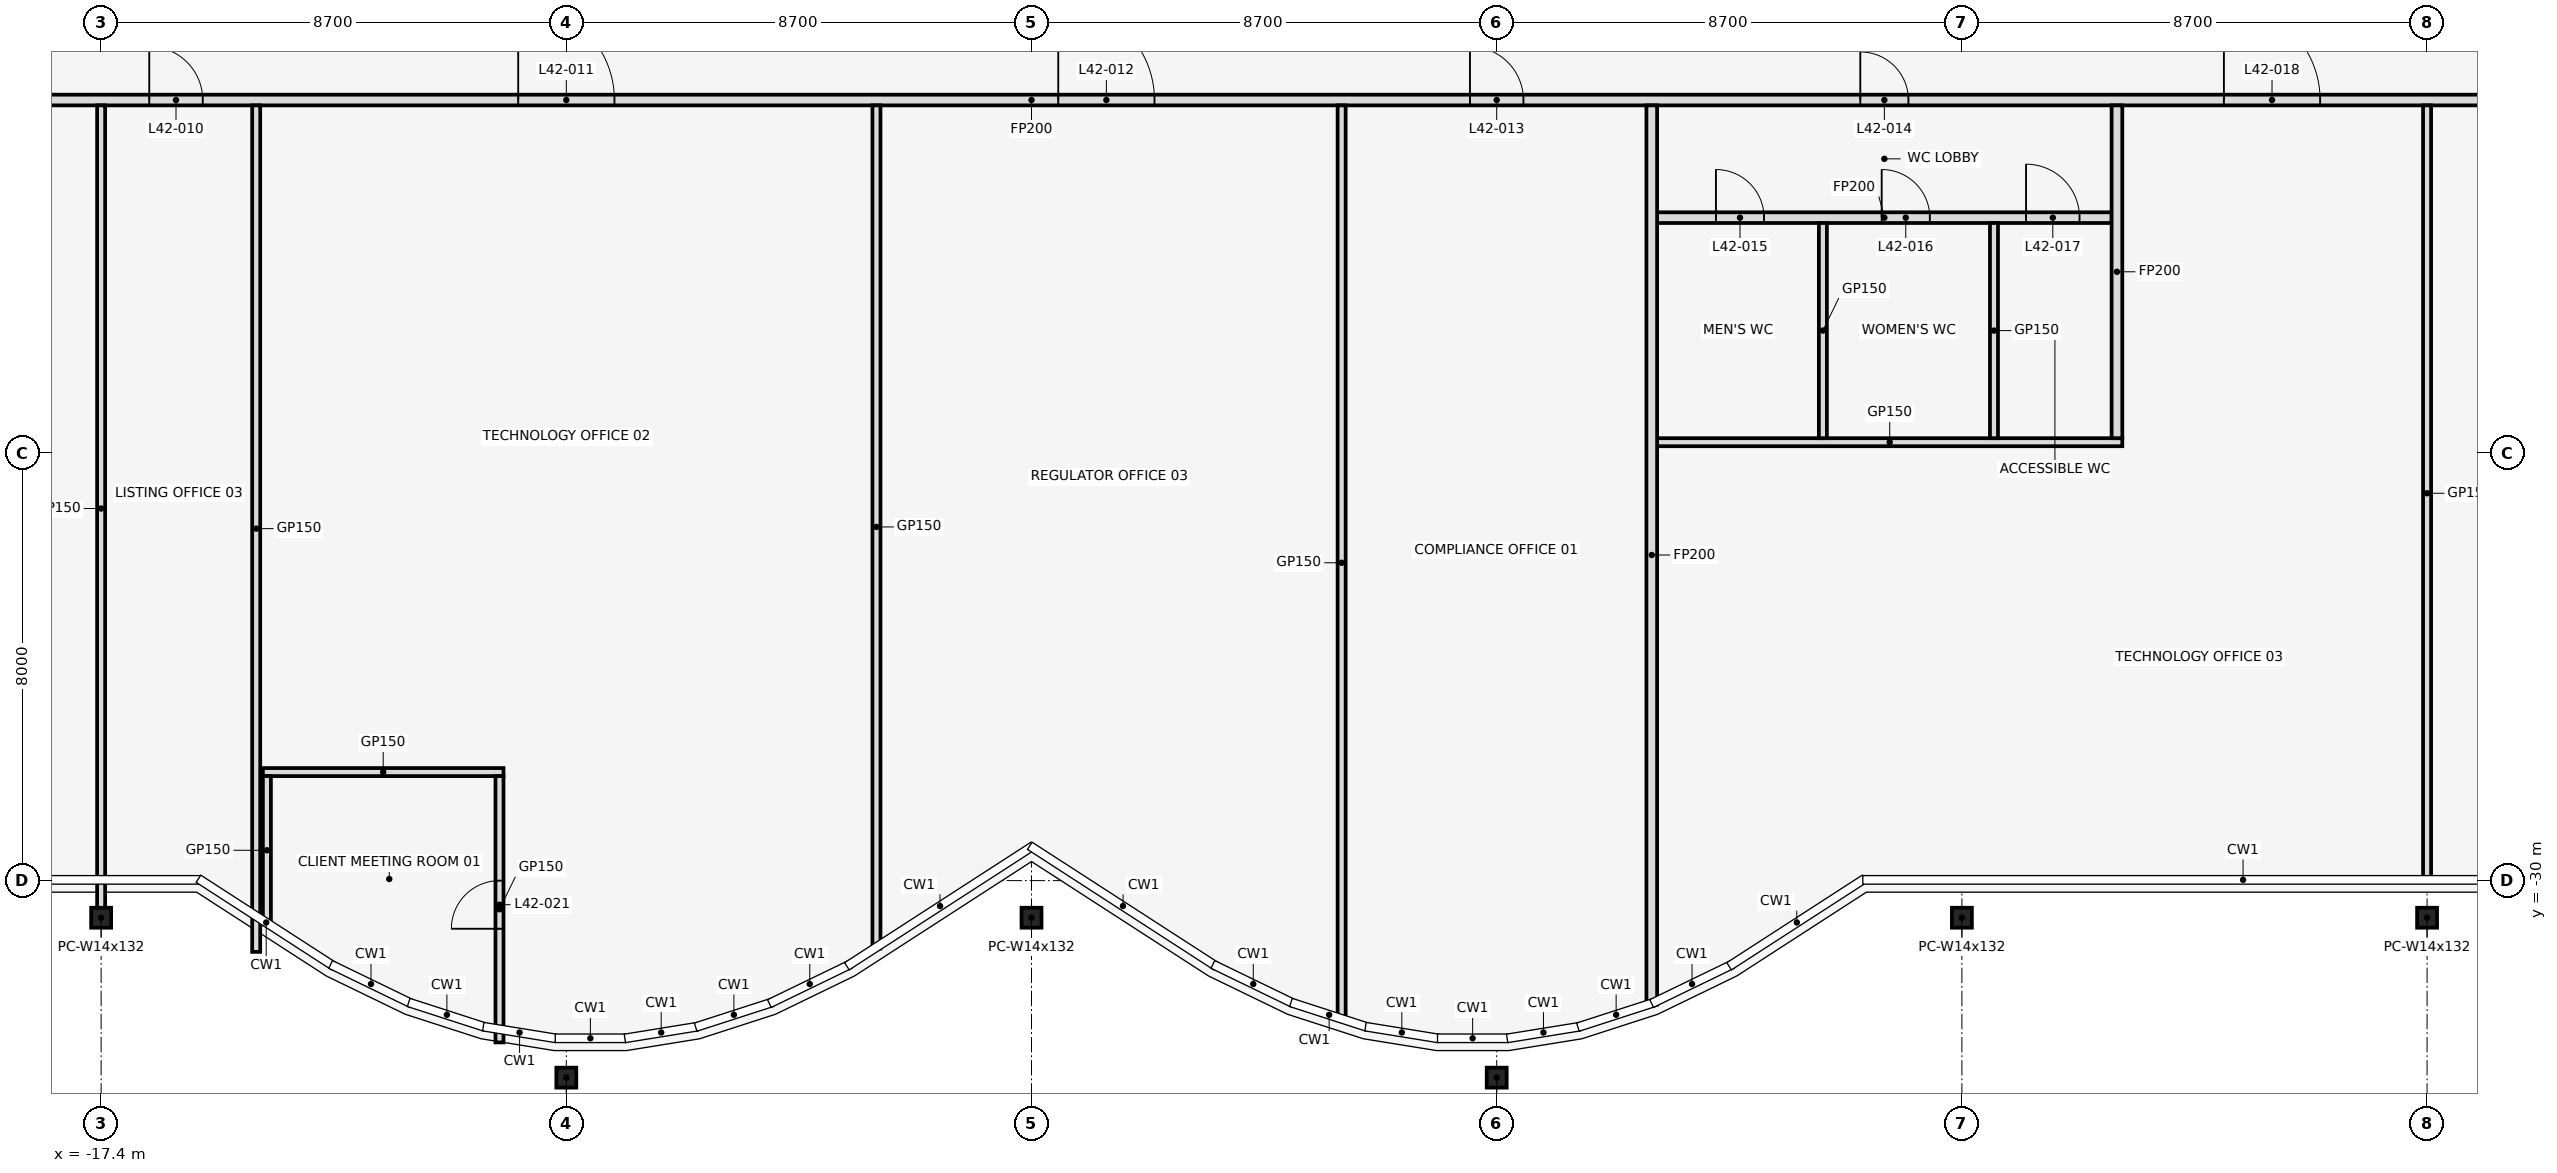
"""IFC4 building model, lengths in metres.
Left out: names, types, materials, properties, quantities, classifications, styles, units other than length and angle.
Written with IfcOpenShell. Run it as: python <this file> out.ifc"""

import sys

from ifc_helpers import new_model, si_unit, direction, frame, frame_2d, origin, origin_2d, place, context, subcontext, project, spatial, rectangle, i_section, extrude, element, fill, save


model = new_model("IFC4")
c1 = context("Model", 3, precision=1e-05, world=origin(), true_north=direction((0.0, 1.0)))
c2 = subcontext(c1, "Body", "Model", "MODEL_VIEW")
j1 = project(units=[si_unit("LENGTHUNIT", "METRE"), si_unit("PLANEANGLEUNIT", "RADIAN")], contexts=[c1])
p1 = place(None, origin())
s1 = spatial("IfcSite", under=j1, at=p1, CompositionType="ELEMENT")
p2 = place(p1, origin())
s2 = spatial("IfcBuilding", under=s1, at=p2, CompositionType="ELEMENT")
p3 = place(p2, frame((0.0, 0.0, 190.9)))
s3 = spatial("IfcBuildingStorey", under=s2, at=p3, CompositionType="ELEMENT", Elevation=190.9)
for number, where, z_axis, x_axis in (
    (1, (-17.4, -30.694, 0.0), (0.0, 0.0, 1.0), (1.0, 0.0, 0.0)),
    (2, (-8.7, -33.685, 0.0), (0.0, 0.0, 1.0), (1.0, 0.0, 0.0)),
    (3, (0.0, -30.694, 0.0), (0.0, 0.0, 1.0), (1.0, 0.0, 0.0)),
    (4, (8.7, -33.685, 0.0), (0.0, 0.0, 1.0), (1.0, 0.0, 0.0)),
    (5, (17.4, -30.694, 0.0), (0.0, 0.0, 1.0), (1.0, 0.0, 0.0)),
    (6, (26.1, -30.694, 0.0), (0.0, 0.0, 1.0), (1.0, 0.0, 0.0)),
):
    element("IfcColumn", number, at=place(p3, frame(where, z_axis=z_axis, x_axis=x_axis)), inside=s3, PredefinedType="COLUMN", context=c2, shape_type="SweptSolid", body=[
        extrude(i_section(OverallWidth=0.373, OverallDepth=0.373, WebThickness=0.016, FlangeThickness=0.026, at=origin_2d()), origin(), (0.0, 0.0, 1.0), 4.1),
    ])
p4 = place(p3, frame((-14.375, -27.97, 0.0), z_axis=(0.0, 0.0, 1.0), x_axis=(1.0, 0.0, 0.0)))
e7 = element("IfcWall", 7, at=p4, inside=s3, PredefinedType="PARTITIONING", context=c2, shape_type="SweptSolid", body=[
    extrude(rectangle(XDim=4.5, YDim=0.15, at=frame_2d((2.25, 0.0))), origin(), (0.0, 0.0, 1.0), 2.96),
])
p5 = place(p3, frame((11.7, -21.8, 0.0), z_axis=(0.0, 0.0, 1.0), x_axis=(1.0, 0.0, 0.0)))
e8 = element("IfcWall", 8, at=p5, inside=s3, PredefinedType="PARTITIONING", context=c2, shape_type="SweptSolid", body=[
    extrude(rectangle(XDim=8.7, YDim=0.15, at=frame_2d((4.35, 0.0))), origin(), (0.0, 0.0, 1.0), 2.96),
])
p6 = place(p3, frame((11.7, -17.6, 0.0), z_axis=(0.0, 0.0, 1.0), x_axis=(1.0, 0.0, 0.0)))
e9 = element("IfcWall", 9, at=p6, inside=s3, PredefinedType="PARTITIONING", context=c2, shape_type="SweptSolid", body=[
    extrude(rectangle(XDim=8.5, YDim=0.2, at=frame_2d((4.25, 0.0))), origin(), (0.0, 0.0, 1.0), 2.96),
])
p7 = place(p6, frame((1.1, 0.0, 0.0)))
e10 = element("IfcOpeningElement", 10, at=p7, cuts=e9, PredefinedType="OPENING", context=c2, shape_type="SweptSolid", body=[
    extrude(rectangle(XDim=0.9, YDim=2.1, at=frame_2d((0.45, 1.05))), frame((0.0, 0.112, 0.0), z_axis=(0.0, -1.0, 0.0), x_axis=(1.0, 0.0, 0.0)), (0.0, 0.0, 1.0), 0.224),
])
p8 = place(p6, frame((4.2, 0.0, 0.0)))
e11 = element("IfcOpeningElement", 11, at=p8, cuts=e9, PredefinedType="OPENING", context=c2, shape_type="SweptSolid", body=[
    extrude(rectangle(XDim=0.9, YDim=2.1, at=frame_2d((0.45, 1.05))), frame((0.0, 0.112, 0.0), z_axis=(0.0, -1.0, 0.0), x_axis=(1.0, 0.0, 0.0)), (0.0, 0.0, 1.0), 0.224),
])
p9 = place(p6, frame((6.9, 0.0, 0.0)))
e12 = element("IfcOpeningElement", 12, at=p9, cuts=e9, PredefinedType="OPENING", context=c2, shape_type="SweptSolid", body=[
    extrude(rectangle(XDim=1.0, YDim=2.1, at=frame_2d((0.5, 1.05))), frame((0.0, 0.112, 0.0), z_axis=(0.0, -1.0, 0.0), x_axis=(1.0, 0.0, 0.0)), (0.0, 0.0, 1.0), 0.224),
])
p10 = place(p3, frame((-32.79, -15.4, 0.0), z_axis=(0.0, 0.0, 1.0), x_axis=(1.0, 0.0, 0.0)))
e13 = element("IfcWall", 13, at=p10, inside=s3, PredefinedType="PARTITIONING", context=c2, shape_type="SweptSolid", body=[
    extrude(rectangle(XDim=65.58, YDim=0.2, at=frame_2d((32.79, 0.0))), origin(), (0.0, 0.0, 1.0), 2.96),
])
p11 = place(p10, frame((1.4, 0.0, 0.0)))
e14 = element("IfcOpeningElement", 14, at=p11, cuts=e13, PredefinedType="OPENING", context=c2, shape_type="SweptSolid", body=[
    extrude(rectangle(XDim=1.0, YDim=2.1, at=frame_2d((0.5, 1.05))), frame((0.0, 0.112, 0.0), z_axis=(0.0, -1.0, 0.0), x_axis=(1.0, 0.0, 0.0)), (0.0, 0.0, 1.0), 0.224),
])
p12 = place(p10, frame((4.69, 0.0, 0.0)))
e15 = element("IfcOpeningElement", 15, at=p12, cuts=e13, PredefinedType="OPENING", context=c2, shape_type="SweptSolid", body=[
    extrude(rectangle(XDim=1.0, YDim=2.1, at=frame_2d((0.5, 1.05))), frame((0.0, 0.112, 0.0), z_axis=(0.0, -1.0, 0.0), x_axis=(1.0, 0.0, 0.0)), (0.0, 0.0, 1.0), 0.224),
])
p13 = place(p10, frame((10.59, 0.0, 0.0)))
e16 = element("IfcOpeningElement", 16, at=p13, cuts=e13, PredefinedType="OPENING", context=c2, shape_type="SweptSolid", body=[
    extrude(rectangle(XDim=1.0, YDim=2.1, at=frame_2d((0.5, 1.05))), frame((0.0, 0.112, 0.0), z_axis=(0.0, -1.0, 0.0), x_axis=(1.0, 0.0, 0.0)), (0.0, 0.0, 1.0), 0.224),
])
p14 = place(p10, frame((16.29, 0.0, 0.0)))
e17 = element("IfcOpeningElement", 17, at=p14, cuts=e13, PredefinedType="OPENING", context=c2, shape_type="SweptSolid", body=[
    extrude(rectangle(XDim=1.0, YDim=2.1, at=frame_2d((0.5, 1.05))), frame((0.0, 0.112, 0.0), z_axis=(0.0, -1.0, 0.0), x_axis=(1.0, 0.0, 0.0)), (0.0, 0.0, 1.0), 0.224),
])
p15 = place(p10, frame((23.19, 0.0, 0.0)))
e18 = element("IfcOpeningElement", 18, at=p15, cuts=e13, PredefinedType="OPENING", context=c2, shape_type="SweptSolid", body=[
    extrude(rectangle(XDim=1.8, YDim=2.1, at=frame_2d((0.9, 1.05))), frame((0.0, 0.112, 0.0), z_axis=(0.0, -1.0, 0.0), x_axis=(1.0, 0.0, 0.0)), (0.0, 0.0, 1.0), 0.224),
])
p16 = place(p10, frame((33.29, 0.0, 0.0)))
e19 = element("IfcOpeningElement", 19, at=p16, cuts=e13, PredefinedType="OPENING", context=c2, shape_type="SweptSolid", body=[
    extrude(rectangle(XDim=1.8, YDim=2.1, at=frame_2d((0.9, 1.05))), frame((0.0, 0.112, 0.0), z_axis=(0.0, -1.0, 0.0), x_axis=(1.0, 0.0, 0.0)), (0.0, 0.0, 1.0), 0.224),
])
p17 = place(p10, frame((40.99, 0.0, 0.0)))
e20 = element("IfcOpeningElement", 20, at=p17, cuts=e13, PredefinedType="OPENING", context=c2, shape_type="SweptSolid", body=[
    extrude(rectangle(XDim=1.0, YDim=2.1, at=frame_2d((0.5, 1.05))), frame((0.0, 0.112, 0.0), z_axis=(0.0, -1.0, 0.0), x_axis=(1.0, 0.0, 0.0)), (0.0, 0.0, 1.0), 0.224),
])
p18 = place(p10, frame((48.29, 0.0, 0.0)))
e21 = element("IfcOpeningElement", 21, at=p18, cuts=e13, PredefinedType="OPENING", context=c2, shape_type="SweptSolid", body=[
    extrude(rectangle(XDim=0.9, YDim=2.1, at=frame_2d((0.45, 1.05))), frame((0.0, 0.112, 0.0), z_axis=(0.0, -1.0, 0.0), x_axis=(1.0, 0.0, 0.0)), (0.0, 0.0, 1.0), 0.224),
])
p19 = place(p10, frame((55.09, 0.0, 0.0)))
e22 = element("IfcOpeningElement", 22, at=p19, cuts=e13, PredefinedType="OPENING", context=c2, shape_type="SweptSolid", body=[
    extrude(rectangle(XDim=1.8, YDim=2.1, at=frame_2d((0.9, 1.05))), frame((0.0, 0.112, 0.0), z_axis=(0.0, -1.0, 0.0), x_axis=(1.0, 0.0, 0.0)), (0.0, 0.0, 1.0), 0.224),
])
p20 = place(p10, frame((61.69, 0.0, 0.0)))
e23 = element("IfcOpeningElement", 23, at=p20, cuts=e13, PredefinedType="OPENING", context=c2, shape_type="SweptSolid", body=[
    extrude(rectangle(XDim=1.0, YDim=2.1, at=frame_2d((0.5, 1.05))), frame((0.0, 0.112, 0.0), z_axis=(0.0, -1.0, 0.0), x_axis=(1.0, 0.0, 0.0)), (0.0, 0.0, 1.0), 0.224),
])
p21 = place(p3, frame((-17.4, -30.58, 0.0), z_axis=(0.0, 0.0, 1.0), x_axis=(0.0, 1.0, 0.0)))
e24 = element("IfcWall", 24, at=p21, inside=s3, PredefinedType="PARTITIONING", context=c2, shape_type="SweptSolid", body=[
    extrude(rectangle(XDim=15.08, YDim=0.15, at=frame_2d((7.54, 0.0))), origin(), (0.0, 0.0, 1.0), 2.96),
])
p22 = place(p3, frame((-14.5, -31.333, 0.0), z_axis=(0.0, 0.0, 1.0), x_axis=(0.0, 1.0, 0.0)))
e25 = element("IfcWall", 25, at=p22, inside=s3, PredefinedType="PARTITIONING", context=c2, shape_type="SweptSolid", body=[
    extrude(rectangle(XDim=15.833, YDim=0.15, at=frame_2d((7.917, 0.0))), origin(), (0.0, 0.0, 1.0), 2.96),
])
p23 = place(p3, frame((-14.3, -30.82, 0.0), z_axis=(0.0, 0.0, 1.0), x_axis=(0.0, 1.0, 0.0)))
e26 = element("IfcWall", 26, at=p23, inside=s3, PredefinedType="PARTITIONING", context=c2, shape_type="SweptSolid", body=[
    extrude(rectangle(XDim=2.775, YDim=0.15, at=frame_2d((1.388, 0.0))), origin(), (0.0, 0.0, 1.0), 2.96),
])
p24 = place(p3, frame((-9.95, -33.026, 0.0), z_axis=(0.0, 0.0, 1.0), x_axis=(0.0, 1.0, 0.0)))
e27 = element("IfcWall", 27, at=p24, inside=s3, PredefinedType="PARTITIONING", context=c2, shape_type="SweptSolid", body=[
    extrude(rectangle(XDim=4.981, YDim=0.15, at=frame_2d((2.491, 0.0))), origin(), (0.0, 0.0, 1.0), 2.96),
])
p25 = place(p24, frame((2.126, 0.0, 0.0)))
e28 = element("IfcOpeningElement", 28, at=p25, cuts=e27, PredefinedType="OPENING", context=c2, shape_type="SweptSolid", body=[
    extrude(rectangle(XDim=0.9, YDim=2.1, at=frame_2d((0.45, 1.05))), frame((0.0, 0.087, 0.0), z_axis=(0.0, -1.0, 0.0), x_axis=(1.0, 0.0, 0.0)), (0.0, 0.0, 1.0), 0.174),
])
p26 = place(p3, frame((-2.9, -31.27, 0.0), z_axis=(0.0, 0.0, 1.0), x_axis=(0.0, 1.0, 0.0)))
e29 = element("IfcWall", 29, at=p26, inside=s3, PredefinedType="PARTITIONING", context=c2, shape_type="SweptSolid", body=[
    extrude(rectangle(XDim=15.77, YDim=0.15, at=frame_2d((7.885, 0.0))), origin(), (0.0, 0.0, 1.0), 2.96),
])
p27 = place(p3, frame((5.8, -32.61, 0.0), z_axis=(0.0, 0.0, 1.0), x_axis=(0.0, 1.0, 0.0)))
e30 = element("IfcWall", 30, at=p27, inside=s3, PredefinedType="PARTITIONING", context=c2, shape_type="SweptSolid", body=[
    extrude(rectangle(XDim=17.11, YDim=0.15, at=frame_2d((8.555, 0.0))), origin(), (0.0, 0.0, 1.0), 2.96),
])
p28 = place(p3, frame((11.6, -32.32, 0.0), z_axis=(0.0, 0.0, 1.0), x_axis=(0.0, 1.0, 0.0)))
e31 = element("IfcWall", 31, at=p28, inside=s3, PredefinedType="PARTITIONING", context=c2, shape_type="SweptSolid", body=[
    extrude(rectangle(XDim=16.82, YDim=0.2, at=frame_2d((8.41, 0.0))), origin(), (0.0, 0.0, 1.0), 2.96),
])
for number, where, z_axis, x_axis in (
    (32, (14.8, -21.725, 0.0), (0.0, 0.0, 1.0), (0.0, 1.0, 0.0)),
    (33, (18.0, -21.725, 0.0), (0.0, 0.0, 1.0), (0.0, 1.0, 0.0)),
):
    element("IfcWall", number, at=place(p3, frame(where, z_axis=z_axis, x_axis=x_axis)), inside=s3, PredefinedType="PARTITIONING", context=c2, shape_type="SweptSolid", body=[
        extrude(rectangle(XDim=4.025, YDim=0.15, at=frame_2d((2.013, 0.0))), origin(), (0.0, 0.0, 1.0), 2.96),
    ])
p29 = place(p3, frame((20.3, -21.725, 0.0), z_axis=(0.0, 0.0, 1.0), x_axis=(0.0, 1.0, 0.0)))
e34 = element("IfcWall", 34, at=p29, inside=s3, PredefinedType="PARTITIONING", context=c2, shape_type="SweptSolid", body=[
    extrude(rectangle(XDim=6.225, YDim=0.2, at=frame_2d((3.113, 0.0))), origin(), (0.0, 0.0, 1.0), 2.96),
])
p30 = place(p3, frame((26.1, -30.01, 0.0), z_axis=(0.0, 0.0, 1.0), x_axis=(0.0, 1.0, 0.0)))
e35 = element("IfcWall", 35, at=p30, inside=s3, PredefinedType="PARTITIONING", context=c2, shape_type="SweptSolid", body=[
    extrude(rectangle(XDim=14.51, YDim=0.15, at=frame_2d((7.255, 0.0))), origin(), (0.0, 0.0, 1.0), 2.96),
])
p31 = place(p14, frame((1.0, 0.0, 0.0), z_axis=(0.0, 0.0, 1.0), x_axis=(-1.0, 0.0, 0.0)))
e36 = element("IfcDoor", 36, at=p31, inside=s3, OperationType="SINGLE_SWING_LEFT", PredefinedType="DOOR", context=c2, shape_type="SweptSolid", body=[
    extrude(rectangle(XDim=1.0, YDim=2.1, at=frame_2d((0.5, 1.05))), frame((0.0, 0.025, 0.0), z_axis=(0.0, -1.0, 0.0), x_axis=(1.0, 0.0, 0.0)), (0.0, 0.0, 1.0), 0.05),
])
fill(e17, e36)
p32 = place(p15, origin())
e37 = element("IfcDoor", 37, at=p32, inside=s3, OperationType="SINGLE_SWING_LEFT", PredefinedType="DOOR", context=c2, shape_type="SweptSolid", body=[
    extrude(rectangle(XDim=1.8, YDim=2.1, at=frame_2d((0.9, 1.05))), frame((0.0, 0.025, 0.0), z_axis=(0.0, -1.0, 0.0), x_axis=(1.0, 0.0, 0.0)), (0.0, 0.0, 1.0), 0.05),
])
fill(e18, e37)
p33 = place(p16, origin())
e38 = element("IfcDoor", 38, at=p33, inside=s3, OperationType="SINGLE_SWING_LEFT", PredefinedType="DOOR", context=c2, shape_type="SweptSolid", body=[
    extrude(rectangle(XDim=1.8, YDim=2.1, at=frame_2d((0.9, 1.05))), frame((0.0, 0.025, 0.0), z_axis=(0.0, -1.0, 0.0), x_axis=(1.0, 0.0, 0.0)), (0.0, 0.0, 1.0), 0.05),
])
fill(e19, e38)
p34 = place(p17, frame((1.0, 0.0, 0.0), z_axis=(0.0, 0.0, 1.0), x_axis=(-1.0, 0.0, 0.0)))
e39 = element("IfcDoor", 39, at=p34, inside=s3, OperationType="SINGLE_SWING_LEFT", PredefinedType="DOOR", context=c2, shape_type="SweptSolid", body=[
    extrude(rectangle(XDim=1.0, YDim=2.1, at=frame_2d((0.5, 1.05))), frame((0.0, 0.025, 0.0), z_axis=(0.0, -1.0, 0.0), x_axis=(1.0, 0.0, 0.0)), (0.0, 0.0, 1.0), 0.05),
])
fill(e20, e39)
p35 = place(p18, frame((0.9, 0.0, 0.0), z_axis=(0.0, 0.0, 1.0), x_axis=(-1.0, 0.0, 0.0)))
e40 = element("IfcDoor", 40, at=p35, inside=s3, OperationType="SINGLE_SWING_RIGHT", PredefinedType="DOOR", context=c2, shape_type="SweptSolid", body=[
    extrude(rectangle(XDim=0.9, YDim=2.1, at=frame_2d((0.45, 1.05))), frame((0.0, 0.025, 0.0), z_axis=(0.0, -1.0, 0.0), x_axis=(1.0, 0.0, 0.0)), (0.0, 0.0, 1.0), 0.05),
])
fill(e21, e40)
p36 = place(p7, frame((0.9, 0.0, 0.0), z_axis=(0.0, 0.0, 1.0), x_axis=(-1.0, 0.0, 0.0)))
e41 = element("IfcDoor", 41, at=p36, inside=s3, OperationType="SINGLE_SWING_RIGHT", PredefinedType="DOOR", context=c2, shape_type="SweptSolid", body=[
    extrude(rectangle(XDim=0.9, YDim=2.1, at=frame_2d((0.45, 1.05))), frame((0.0, 0.025, 0.0), z_axis=(0.0, -1.0, 0.0), x_axis=(1.0, 0.0, 0.0)), (0.0, 0.0, 1.0), 0.05),
])
fill(e10, e41)
p37 = place(p8, frame((0.9, 0.0, 0.0), z_axis=(0.0, 0.0, 1.0), x_axis=(-1.0, 0.0, 0.0)))
e42 = element("IfcDoor", 42, at=p37, inside=s3, OperationType="SINGLE_SWING_LEFT", PredefinedType="DOOR", context=c2, shape_type="SweptSolid", body=[
    extrude(rectangle(XDim=0.9, YDim=2.1, at=frame_2d((0.45, 1.05))), frame((0.0, 0.025, 0.0), z_axis=(0.0, -1.0, 0.0), x_axis=(1.0, 0.0, 0.0)), (0.0, 0.0, 1.0), 0.05),
])
fill(e11, e42)
p38 = place(p9, frame((1.0, 0.0, 0.0), z_axis=(0.0, 0.0, 1.0), x_axis=(-1.0, 0.0, 0.0)))
e43 = element("IfcDoor", 43, at=p38, inside=s3, OperationType="SINGLE_SWING_RIGHT", PredefinedType="DOOR", context=c2, shape_type="SweptSolid", body=[
    extrude(rectangle(XDim=1.0, YDim=2.1, at=frame_2d((0.5, 1.05))), frame((0.0, 0.025, 0.0), z_axis=(0.0, -1.0, 0.0), x_axis=(1.0, 0.0, 0.0)), (0.0, 0.0, 1.0), 0.05),
])
fill(e12, e43)
p39 = place(p19, origin())
e44 = element("IfcDoor", 44, at=p39, inside=s3, OperationType="SINGLE_SWING_LEFT", PredefinedType="DOOR", context=c2, shape_type="SweptSolid", body=[
    extrude(rectangle(XDim=1.8, YDim=2.1, at=frame_2d((0.9, 1.05))), frame((0.0, 0.025, 0.0), z_axis=(0.0, -1.0, 0.0), x_axis=(1.0, 0.0, 0.0)), (0.0, 0.0, 1.0), 0.05),
])
fill(e22, e44)
p40 = place(p25, origin())
e45 = element("IfcDoor", 45, at=p40, inside=s3, OperationType="SINGLE_SWING_RIGHT", PredefinedType="DOOR", context=c2, shape_type="SweptSolid", body=[
    extrude(rectangle(XDim=0.9, YDim=2.1, at=frame_2d((0.45, 1.05))), frame((0.0, 0.025, 0.0), z_axis=(0.0, -1.0, 0.0), x_axis=(1.0, 0.0, 0.0)), (0.0, 0.0, 1.0), 0.05),
])
fill(e28, e45)
save(model, sys.argv[1])
